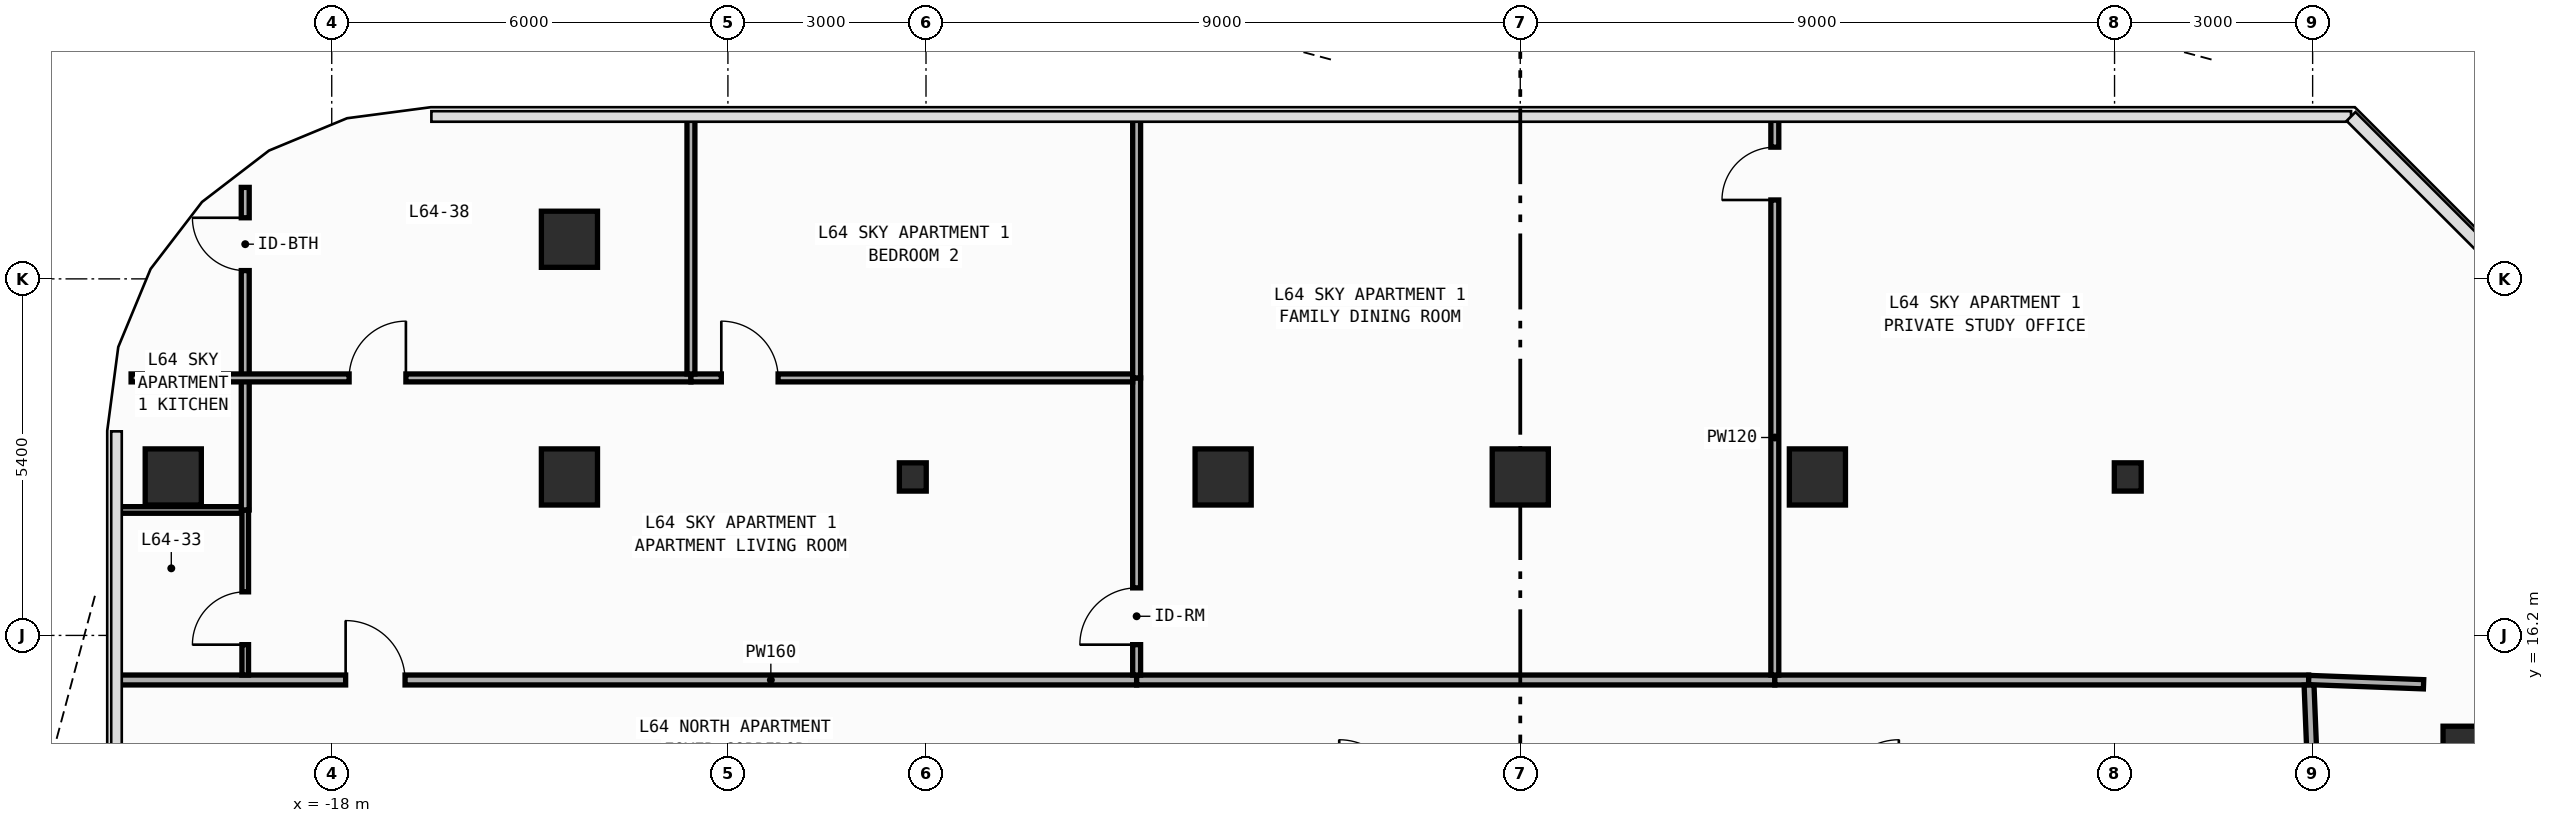
"""IFC4 building model, lengths in metres.
Left out: names, types, materials, properties, quantities, classifications, styles, units other than length and angle.
Written with IfcOpenShell. Run it as: python <this file> out.ifc"""

import sys

from ifc_helpers import new_model, si_unit, direction, frame, frame_2d, origin, origin_2d, place, context, subcontext, project, spatial, rectangle, i_section, extrude, element, fill, save


model = new_model("IFC4")
c1 = context("Model", 3, precision=1e-05, world=origin(), true_north=direction((0.0, 1.0)))
c2 = subcontext(c1, "Body", "Model", "MODEL_VIEW")
j1 = project(units=[si_unit("LENGTHUNIT", "METRE"), si_unit("PLANEANGLEUNIT", "RADIAN")], contexts=[c1])
p1 = place(None, origin())
s1 = spatial("IfcSite", under=j1, at=p1, CompositionType="ELEMENT")
p2 = place(p1, origin())
s2 = spatial("IfcBuilding", under=s1, at=p2, CompositionType="ELEMENT")
p3 = place(p2, frame((0.0, 0.0, 269.2)))
s3 = spatial("IfcBuildingStorey", under=s2, at=p3, CompositionType="ELEMENT", Elevation=269.2)
for number, where, z_axis, x_axis in (
    (1, (-9.2, 18.6, 0.0), (0.0, 0.0, 1.0), (1.0, 0.0, 0.0)),
    (2, (9.2, 18.6, 0.0), (0.0, 0.0, 1.0), (1.0, 0.0, 0.0)),
):
    element("IfcColumn", number, at=place(p3, frame(where, z_axis=z_axis, x_axis=x_axis)), inside=s3, PredefinedType="COLUMN", context=c2, shape_type="SweptSolid", body=[
        extrude(i_section(OverallWidth=0.407, OverallDepth=0.428, WebThickness=0.02, FlangeThickness=0.035, FilletRadius=0.022, at=origin_2d()), origin(), (0.0, 0.0, 1.0), 3.6),
    ])
for number, where, z_axis, x_axis in (
    (3, (-20.4, 18.6, 0.0), (0.0, 0.0, 1.0), (1.0, 0.0, 0.0)),
    (4, (-14.4, 18.6, 0.0), (0.0, 0.0, 1.0), (1.0, 0.0, 0.0)),
    (5, (14.4, 14.4, 0.0), (0.0, 0.0, 1.0), (1.0, 0.0, 0.0)),
    (6, (-4.5, 18.6, 0.0), (0.0, 0.0, 1.0), (1.0, 0.0, 0.0)),
    (7, (0.0, 18.6, 0.0), (0.0, 0.0, 1.0), (1.0, 0.0, 0.0)),
    (8, (4.5, 18.6, 0.0), (0.0, 0.0, 1.0), (1.0, 0.0, 0.0)),
    (9, (-14.4, 22.2, 0.0), (0.0, 0.0, 1.0), (1.0, 0.0, 0.0)),
):
    element("IfcColumn", number, at=place(p3, frame(where, z_axis=z_axis, x_axis=x_axis)), inside=s3, PredefinedType="COLUMN", context=c2, shape_type="SweptSolid", body=[
        extrude(rectangle(XDim=0.85, YDim=0.85, at=origin_2d()), origin(), (0.0, 0.0, 1.0), 3.6),
    ])
p4 = place(p3, frame((-21.255, 15.525, 0.0), z_axis=(0.0, 0.0, 1.0), x_axis=(1.0, 0.0, 0.0)))
e10 = element("IfcWall", 10, at=p4, inside=s3, PredefinedType="PARTITIONING", context=c2, shape_type="SweptSolid", body=[
    extrude(rectangle(XDim=15.445, YDim=0.15, at=frame_2d((7.722, 0.0))), origin(), (0.0, 0.0, 1.0), 3.25),
])
p5 = place(p4, frame((3.466, 0.0, 0.0)))
e11 = element("IfcOpeningElement", 11, at=p5, cuts=e10, PredefinedType="OPENING", context=c2, shape_type="SweptSolid", body=[
    extrude(rectangle(XDim=0.9, YDim=2.15, at=frame_2d((0.45, 1.075))), frame((0.0, 0.085, 0.0), z_axis=(0.0, -1.0, 0.0), x_axis=(1.0, 0.0, 0.0)), (0.0, 0.0, 1.0), 0.17),
])
p6 = place(p3, frame((-5.81, 15.525, 0.0), z_axis=(0.0, 0.0, 1.0), x_axis=(1.0, 0.0, 0.0)))
e12 = element("IfcWall", 12, at=p6, inside=s3, PredefinedType="PARTITIONING", context=c2, shape_type="SweptSolid", body=[
    extrude(rectangle(XDim=9.665, YDim=0.15, at=frame_2d((4.833, 0.0))), origin(), (0.0, 0.0, 1.0), 3.25),
])
p7 = place(p3, frame((3.855, 15.525, 0.0), z_axis=(0.0, 0.0, 1.0), x_axis=(1.0, 0.0, 0.0)))
e13 = element("IfcWall", 13, at=p7, inside=s3, PredefinedType="PARTITIONING", context=c2, shape_type="SweptSolid", body=[
    extrude(rectangle(XDim=8.085, YDim=0.15, at=frame_2d((4.042, 0.0))), origin(), (0.0, 0.0, 1.0), 3.25),
])
p8 = place(p3, frame((12.015, 13.72, 0.0), z_axis=(0.0, 0.0, 1.0), x_axis=(-0.040046877756, 0.99919780203, 0.0)))
e14 = element("IfcWall", 14, at=p8, inside=s3, PredefinedType="PARTITIONING", context=c2, shape_type="SweptSolid", body=[
    extrude(rectangle(XDim=1.731, YDim=0.15, at=frame_2d((0.866, 0.0))), origin(), (0.0, 0.0, 1.0), 3.25),
])
p9 = place(p3, frame((-21.255, 18.1, 0.0), z_axis=(0.0, 0.0, 1.0), x_axis=(1.0, 0.0, 0.0)))
e15 = element("IfcWall", 15, at=p9, inside=s3, PredefinedType="PARTITIONING", context=c2, shape_type="SweptSolid", body=[
    extrude(rectangle(XDim=1.895, YDim=0.1, at=frame_2d((0.947, 0.0))), origin(), (0.0, 0.0, 1.0), 3.25),
])
p10 = place(p3, frame((-19.31, 15.6, 0.0), z_axis=(0.0, 0.0, 1.0), x_axis=(0.0, 1.0, 0.0)))
e16 = element("IfcWall", 16, at=p10, inside=s3, PredefinedType="PARTITIONING", context=c2, shape_type="SweptSolid", body=[
    extrude(rectangle(XDim=2.5, YDim=0.1, at=frame_2d((1.25, 0.0))), origin(), (0.0, 0.0, 1.0), 3.25),
])
p11 = place(p10, frame((0.46, 0.0, 0.0)))
e17 = element("IfcOpeningElement", 17, at=p11, cuts=e16, PredefinedType="OPENING", context=c2, shape_type="SweptSolid", body=[
    extrude(rectangle(XDim=0.8, YDim=2.1, at=frame_2d((0.4, 1.05))), frame((0.0, 0.06, 0.0), z_axis=(0.0, -1.0, 0.0), x_axis=(1.0, 0.0, 0.0)), (0.0, 0.0, 1.0), 0.12),
])
p12 = place(p3, frame((-19.31, 18.1, 0.0), z_axis=(0.0, 0.0, 1.0), x_axis=(0.0, 1.0, 0.0)))
e18 = element("IfcWall", 18, at=p12, inside=s3, PredefinedType="PARTITIONING", context=c2, shape_type="SweptSolid", body=[
    extrude(rectangle(XDim=2.0, YDim=0.12, at=frame_2d((1.0, 0.0))), origin(), (0.0, 0.0, 1.0), 3.25),
])
p13 = place(p3, frame((-19.31, 20.1, 0.0), z_axis=(0.0, 0.0, 1.0), x_axis=(0.0, 1.0, 0.0)))
e19 = element("IfcWall", 19, at=p13, inside=s3, PredefinedType="PARTITIONING", context=c2, shape_type="SweptSolid", body=[
    extrude(rectangle(XDim=2.885, YDim=0.12, at=frame_2d((1.443, 0.0))), origin(), (0.0, 0.0, 1.0), 3.25),
])
p14 = place(p13, frame((1.625, 0.0, 0.0)))
e20 = element("IfcOpeningElement", 20, at=p14, cuts=e19, PredefinedType="OPENING", context=c2, shape_type="SweptSolid", body=[
    extrude(rectangle(XDim=0.8, YDim=2.1, at=frame_2d((0.4, 1.05))), frame((0.0, 0.07, 0.0), z_axis=(0.0, -1.0, 0.0), x_axis=(1.0, 0.0, 0.0)), (0.0, 0.0, 1.0), 0.14),
])
p15 = place(p3, frame((-5.81, 15.6, 0.0), z_axis=(0.0, 0.0, 1.0), x_axis=(0.0, 1.0, 0.0)))
e21 = element("IfcWall", 21, at=p15, inside=s3, PredefinedType="PARTITIONING", context=c2, shape_type="SweptSolid", body=[
    extrude(rectangle(XDim=4.5, YDim=0.12, at=frame_2d((2.25, 0.0))), origin(), (0.0, 0.0, 1.0), 3.25),
])
p16 = place(p15, frame((0.46, 0.0, 0.0)))
e22 = element("IfcOpeningElement", 22, at=p16, cuts=e21, PredefinedType="OPENING", context=c2, shape_type="SweptSolid", body=[
    extrude(rectangle(XDim=0.86, YDim=2.15, at=frame_2d((0.43, 1.075))), frame((0.0, 0.07, 0.0), z_axis=(0.0, -1.0, 0.0), x_axis=(1.0, 0.0, 0.0)), (0.0, 0.0, 1.0), 0.14),
])
p17 = place(p3, frame((-21.039, 20.1, 0.0), z_axis=(0.0, 0.0, 1.0), x_axis=(1.0, 0.0, 0.0)))
e23 = element("IfcWall", 23, at=p17, inside=s3, PredefinedType="PARTITIONING", context=c2, shape_type="SweptSolid", body=[
    extrude(rectangle(XDim=8.479, YDim=0.12, at=frame_2d((4.239, 0.0))), origin(), (0.0, 0.0, 1.0), 3.25),
])
p18 = place(p17, frame((3.302, 0.0, 0.0)))
e24 = element("IfcOpeningElement", 24, at=p18, cuts=e23, PredefinedType="OPENING", context=c2, shape_type="SweptSolid", body=[
    extrude(rectangle(XDim=0.86, YDim=2.15, at=frame_2d((0.43, 1.075))), frame((0.0, 0.07, 0.0), z_axis=(0.0, -1.0, 0.0), x_axis=(1.0, 0.0, 0.0)), (0.0, 0.0, 1.0), 0.14),
])
p19 = place(p3, frame((-12.56, 20.1, 0.0), z_axis=(0.0, 0.0, 1.0), x_axis=(1.0, 0.0, 0.0)))
e25 = element("IfcWall", 25, at=p19, inside=s3, PredefinedType="PARTITIONING", context=c2, shape_type="SweptSolid", body=[
    extrude(rectangle(XDim=6.69, YDim=0.12, at=frame_2d((3.345, 0.0))), origin(), (0.0, 0.0, 1.0), 3.25),
])
p20 = place(p19, frame((0.46, 0.0, 0.0)))
e26 = element("IfcOpeningElement", 26, at=p20, cuts=e25, PredefinedType="OPENING", context=c2, shape_type="SweptSolid", body=[
    extrude(rectangle(XDim=0.86, YDim=2.15, at=frame_2d((0.43, 1.075))), frame((0.0, 0.07, 0.0), z_axis=(0.0, -1.0, 0.0), x_axis=(1.0, 0.0, 0.0)), (0.0, 0.0, 1.0), 0.14),
])
p21 = place(p3, frame((3.855, 15.6, 0.0), z_axis=(0.0, 0.0, 1.0), x_axis=(0.0, 1.0, 0.0)))
e27 = element("IfcWall", 27, at=p21, inside=s3, PredefinedType="PARTITIONING", context=c2, shape_type="SweptSolid", body=[
    extrude(rectangle(XDim=8.455, YDim=0.12, at=frame_2d((4.228, 0.0))), origin(), (0.0, 0.0, 1.0), 3.25),
])
p22 = place(p21, frame((7.195, 0.0, 0.0)))
e28 = element("IfcOpeningElement", 28, at=p22, cuts=e27, PredefinedType="OPENING", context=c2, shape_type="SweptSolid", body=[
    extrude(rectangle(XDim=0.8, YDim=2.1, at=frame_2d((0.4, 1.05))), frame((0.0, 0.07, 0.0), z_axis=(0.0, -1.0, 0.0), x_axis=(1.0, 0.0, 0.0)), (0.0, 0.0, 1.0), 0.14),
])
p23 = place(p3, frame((-5.81, 20.1, 0.0), z_axis=(0.0, 0.0, 1.0), x_axis=(0.0, 1.0, 0.0)))
e29 = element("IfcWall", 29, at=p23, inside=s3, PredefinedType="PARTITIONING", context=c2, shape_type="SweptSolid", body=[
    extrude(rectangle(XDim=3.955, YDim=0.12, at=frame_2d((1.978, 0.0))), origin(), (0.0, 0.0, 1.0), 3.25),
])
p24 = place(p3, frame((11.94, 15.525, 0.0), z_axis=(0.0, 0.0, 1.0), x_axis=(0.999304229002, -0.037296888581, 0.0)))
e30 = element("IfcWall", 30, at=p24, inside=s3, PredefinedType="PARTITIONING", context=c2, shape_type="SweptSolid", body=[
    extrude(rectangle(XDim=1.741, YDim=0.14, at=frame_2d((0.871, 0.0))), origin(), (0.0, 0.0, 1.0), 3.25),
])
p25 = place(p3, frame((-12.56, 20.16, 0.0), z_axis=(0.0, 0.0, 1.0), x_axis=(0.0, 1.0, 0.0)))
e31 = element("IfcWall", 31, at=p25, inside=s3, PredefinedType="PARTITIONING", context=c2, shape_type="SweptSolid", body=[
    extrude(rectangle(XDim=3.895, YDim=0.12, at=frame_2d((1.948, 0.0))), origin(), (0.0, 0.0, 1.0), 3.25),
])
p26 = place(p5, origin())
e32 = element("IfcDoor", 32, at=p26, inside=s3, OperationType="SINGLE_SWING_LEFT", PredefinedType="DOOR", context=c2, shape_type="SweptSolid", body=[
    extrude(rectangle(XDim=0.9, YDim=2.15, at=frame_2d((0.45, 1.075))), frame((0.0, 0.025, 0.0), z_axis=(0.0, -1.0, 0.0), x_axis=(1.0, 0.0, 0.0)), (0.0, 0.0, 1.0), 0.05),
])
fill(e11, e32)
p27 = place(p11, origin())
e33 = element("IfcDoor", 33, at=p27, inside=s3, OperationType="SINGLE_SWING_LEFT", PredefinedType="DOOR", context=c2, shape_type="SweptSolid", body=[
    extrude(rectangle(XDim=0.8, YDim=2.1, at=frame_2d((0.4, 1.05))), frame((0.0, 0.025, 0.0), z_axis=(0.0, -1.0, 0.0), x_axis=(1.0, 0.0, 0.0)), (0.0, 0.0, 1.0), 0.05),
])
fill(e17, e33)
p28 = place(p16, origin())
e34 = element("IfcDoor", 34, at=p28, inside=s3, OperationType="SINGLE_SWING_LEFT", PredefinedType="DOOR", context=c2, shape_type="SweptSolid", body=[
    extrude(rectangle(XDim=0.86, YDim=2.15, at=frame_2d((0.43, 1.075))), frame((0.0, 0.025, 0.0), z_axis=(0.0, -1.0, 0.0), x_axis=(1.0, 0.0, 0.0)), (0.0, 0.0, 1.0), 0.05),
])
fill(e22, e34)
p29 = place(p18, origin())
e35 = element("IfcDoor", 35, at=p29, inside=s3, OperationType="SINGLE_SWING_RIGHT", PredefinedType="DOOR", context=c2, shape_type="SweptSolid", body=[
    extrude(rectangle(XDim=0.86, YDim=2.15, at=frame_2d((0.43, 1.075))), frame((0.0, 0.025, 0.0), z_axis=(0.0, -1.0, 0.0), x_axis=(1.0, 0.0, 0.0)), (0.0, 0.0, 1.0), 0.05),
])
fill(e24, e35)
p30 = place(p20, origin())
e36 = element("IfcDoor", 36, at=p30, inside=s3, OperationType="SINGLE_SWING_LEFT", PredefinedType="DOOR", context=c2, shape_type="SweptSolid", body=[
    extrude(rectangle(XDim=0.86, YDim=2.15, at=frame_2d((0.43, 1.075))), frame((0.0, 0.025, 0.0), z_axis=(0.0, -1.0, 0.0), x_axis=(1.0, 0.0, 0.0)), (0.0, 0.0, 1.0), 0.05),
])
fill(e26, e36)
p31 = place(p22, origin())
e37 = element("IfcDoor", 37, at=p31, inside=s3, OperationType="SINGLE_SWING_LEFT", PredefinedType="DOOR", context=c2, shape_type="SweptSolid", body=[
    extrude(rectangle(XDim=0.8, YDim=2.1, at=frame_2d((0.4, 1.05))), frame((0.0, 0.025, 0.0), z_axis=(0.0, -1.0, 0.0), x_axis=(1.0, 0.0, 0.0)), (0.0, 0.0, 1.0), 0.05),
])
fill(e28, e37)
p32 = place(p14, origin())
e38 = element("IfcDoor", 38, at=p32, inside=s3, OperationType="SINGLE_SWING_RIGHT", PredefinedType="DOOR", context=c2, shape_type="SweptSolid", body=[
    extrude(rectangle(XDim=0.8, YDim=2.1, at=frame_2d((0.4, 1.05))), frame((0.0, 0.025, 0.0), z_axis=(0.0, -1.0, 0.0), x_axis=(1.0, 0.0, 0.0)), (0.0, 0.0, 1.0), 0.05),
])
fill(e20, e38)
save(model, sys.argv[1])
